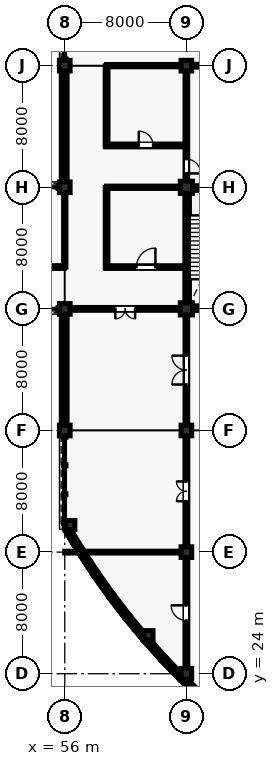
"""IFC4 building model, lengths in metres.
Left out: names, types, materials, properties, quantities, classifications, styles, units other than length and angle.
Written with IfcOpenShell. Run it as: python <this file> out.ifc"""

import sys

from ifc_helpers import new_model, si_unit, direction, frame, frame_2d, origin, origin_2d, place, context, subcontext, project, spatial, rectangle, extrude, element, fill, save


model = new_model("IFC4")
c1 = context("Model", 3, precision=1e-05, world=origin(), true_north=direction((0.0, 1.0)))
c2 = subcontext(c1, "Body", "Model", "MODEL_VIEW")
j1 = project(units=[si_unit("LENGTHUNIT", "METRE"), si_unit("PLANEANGLEUNIT", "RADIAN")], contexts=[c1])
p1 = place(None, origin())
s1 = spatial("IfcSite", under=j1, at=p1, CompositionType="ELEMENT")
p2 = place(p1, origin())
s2 = spatial("IfcBuilding", under=s1, at=p2, CompositionType="ELEMENT")
p3 = place(p2, origin())
s3 = spatial("IfcBuildingStorey", under=s2, at=p3, CompositionType="ELEMENT", Elevation=0.0)
for number, where, z_axis, x_axis in (
    (1, (56.0, 40.0, 0.0), (0.0, 0.0, 1.0), (1.0, 0.0, 0.0)),
    (2, (56.0, 48.0, 0.0), (0.0, 0.0, 1.0), (1.0, 0.0, 0.0)),
    (3, (56.0, 56.0, 0.0), (0.0, 0.0, 1.0), (1.0, 0.0, 0.0)),
    (4, (56.0, 64.0, 0.0), (0.0, 0.0, 1.0), (1.0, 0.0, 0.0)),
    (5, (64.0, 24.0, 0.0), (0.0, 0.0, 1.0), (1.0, 0.0, 0.0)),
    (6, (64.0, 32.0, 0.0), (0.0, 0.0, 1.0), (1.0, 0.0, 0.0)),
    (7, (64.0, 40.0, 0.0), (0.0, 0.0, 1.0), (1.0, 0.0, 0.0)),
):
    element("IfcColumn", number, at=place(p3, frame(where, z_axis=z_axis, x_axis=x_axis)), inside=s3, PredefinedType="COLUMN", context=c2, shape_type="SweptSolid", body=[
        extrude(rectangle(XDim=0.7, YDim=0.7, at=origin_2d()), origin(), (0.0, 0.0, 1.0), 5.28),
    ])
for number, where, z_axis, x_axis in (
    (8, (64.0, 48.0, 0.0), (0.0, 0.0, 1.0), (1.0, 0.0, 0.0)),
    (9, (64.0, 56.0, 0.0), (0.0, 0.0, 1.0), (1.0, 0.0, 0.0)),
):
    element("IfcColumn", number, at=place(p3, frame(where, z_axis=z_axis, x_axis=x_axis)), inside=s3, PredefinedType="COLUMN", context=c2, shape_type="SweptSolid", body=[
        extrude(rectangle(XDim=0.8, YDim=0.8, at=origin_2d()), origin(), (0.0, 0.0, 1.0), 5.28),
    ])
p4 = place(p3, frame((64.0, 64.0, 0.0), z_axis=(0.0, 0.0, 1.0), x_axis=(1.0, 0.0, 0.0)))
e10 = element("IfcColumn", 10, at=p4, inside=s3, PredefinedType="COLUMN", context=c2, shape_type="SweptSolid", body=[
    extrude(rectangle(XDim=0.7, YDim=0.7, at=origin_2d()), origin(), (0.0, 0.0, 1.0), 5.28),
])
for number, where, z_axis, x_axis in (
    (11, (56.364, 33.779, 0.0), (0.0, 0.0, 1.0), (1.0, 0.0, 0.0)),
    (12, (61.505, 26.533, 0.0), (0.0, 0.0, 1.0), (1.0, 0.0, 0.0)),
):
    element("IfcColumn", number, at=place(p3, frame(where, z_axis=z_axis, x_axis=x_axis)), inside=s3, PredefinedType="COLUMN", context=c2, shape_type="SweptSolid", body=[
        extrude(rectangle(XDim=0.6, YDim=0.6, at=origin_2d()), origin(), (0.0, 0.0, 1.0), 5.28),
    ])
p5 = place(p3, frame((56.133, 33.649, 0.0), z_axis=(0.0, 0.0, 1.0), x_axis=(0.51607516088, -0.856543302071, 0.0)))
e13 = element("IfcWall", 13, at=p5, inside=s3, PredefinedType="SOLIDWALL", context=c2, shape_type="SweptSolid", body=[
    extrude(rectangle(XDim=1.795, YDim=0.305, at=frame_2d((0.897, 0.0))), origin(), (0.0, 0.0, 1.0), 5.035),
])
p6 = place(p3, frame((57.056, 32.117, 0.0), z_axis=(0.0, 0.0, 1.0), x_axis=(0.547681678944, -0.836686786408, 0.0)))
e14 = element("IfcWall", 14, at=p6, inside=s3, PredefinedType="SOLIDWALL", context=c2, shape_type="SweptSolid", body=[
    extrude(rectangle(XDim=1.795, YDim=0.305, at=frame_2d((0.897, 0.0))), origin(), (0.0, 0.0, 1.0), 5.035),
])
p7 = place(p6, frame((0.347, 0.0, 0.9)))
e15 = element("IfcOpeningElement", 15, at=p7, cuts=e14, PredefinedType="OPENING", context=c2, shape_type="SweptSolid", body=[
    extrude(rectangle(XDim=1.1, YDim=2.1, at=frame_2d((0.55, 1.05))), frame((0.0, 0.162, 0.0), z_axis=(0.0, -1.0, 0.0), x_axis=(1.0, 0.0, 0.0)), (0.0, 0.0, 1.0), 0.325),
])
p8 = place(p3, frame((58.036, 30.62, 0.0), z_axis=(0.0, 0.0, 1.0), x_axis=(0.578662393636, -0.815567185578, 0.0)))
e16 = element("IfcWall", 16, at=p8, inside=s3, PredefinedType="SOLIDWALL", context=c2, shape_type="SweptSolid", body=[
    extrude(rectangle(XDim=1.795, YDim=0.305, at=frame_2d((0.897, 0.0))), origin(), (0.0, 0.0, 1.0), 5.035),
])
p9 = place(p8, frame((0.348, 0.0, 0.9)))
e17 = element("IfcOpeningElement", 17, at=p9, cuts=e16, PredefinedType="OPENING", context=c2, shape_type="SweptSolid", body=[
    extrude(rectangle(XDim=1.1, YDim=2.1, at=frame_2d((0.55, 1.05))), frame((0.0, 0.162, 0.0), z_axis=(0.0, -1.0, 0.0), x_axis=(1.0, 0.0, 0.0)), (0.0, 0.0, 1.0), 0.325),
])
p10 = place(p3, frame((59.072, 29.16, 0.0), z_axis=(0.0, 0.0, 1.0), x_axis=(0.608776981616, -0.793341406114, 0.0)))
e18 = element("IfcWall", 18, at=p10, inside=s3, PredefinedType="SOLIDWALL", context=c2, shape_type="SweptSolid", body=[
    extrude(rectangle(XDim=1.795, YDim=0.305, at=frame_2d((0.897, 0.0))), origin(), (0.0, 0.0, 1.0), 5.035),
])
p11 = place(p10, frame((0.347, 0.0, 0.9)))
e19 = element("IfcOpeningElement", 19, at=p11, cuts=e18, PredefinedType="OPENING", context=c2, shape_type="SweptSolid", body=[
    extrude(rectangle(XDim=1.1, YDim=2.1, at=frame_2d((0.55, 1.05))), frame((0.0, 0.162, 0.0), z_axis=(0.0, -1.0, 0.0), x_axis=(1.0, 0.0, 0.0)), (0.0, 0.0, 1.0), 0.325),
])
p12 = place(p3, frame((60.161, 27.74, 0.0), z_axis=(0.0, 0.0, 1.0), x_axis=(0.638054732073, -0.769991012207, 0.0)))
e20 = element("IfcWall", 20, at=p12, inside=s3, PredefinedType="SOLIDWALL", context=c2, shape_type="SweptSolid", body=[
    extrude(rectangle(XDim=1.795, YDim=0.305, at=frame_2d((0.897, 0.0))), origin(), (0.0, 0.0, 1.0), 5.035),
])
p13 = place(p3, frame((61.302, 26.363, 0.0), z_axis=(0.0, 0.0, 1.0), x_axis=(0.666277888361, -0.745703543965, 0.0)))
e21 = element("IfcWall", 21, at=p13, inside=s3, PredefinedType="SOLIDWALL", context=c2, shape_type="SweptSolid", body=[
    extrude(rectangle(XDim=1.795, YDim=0.305, at=frame_2d((0.897, 0.0))), origin(), (0.0, 0.0, 1.0), 5.035),
])
p14 = place(p3, frame((62.494, 25.029, 0.0), z_axis=(0.0, 0.0, 1.0), x_axis=(0.693722700342, -0.720242191926, 0.0)))
e22 = element("IfcWall", 22, at=p14, inside=s3, PredefinedType="SOLIDWALL", context=c2, shape_type="SweptSolid", body=[
    extrude(rectangle(XDim=1.795, YDim=0.305, at=frame_2d((0.897, 0.0))), origin(), (0.0, 0.0, 1.0), 5.035),
])
p15 = place(p14, frame((0.347, 0.0, 0.9)))
e23 = element("IfcOpeningElement", 23, at=p15, cuts=e22, PredefinedType="OPENING", context=c2, shape_type="SweptSolid", body=[
    extrude(rectangle(XDim=1.1, YDim=2.1, at=frame_2d((0.55, 1.05))), frame((0.0, 0.162, 0.0), z_axis=(0.0, -1.0, 0.0), x_axis=(1.0, 0.0, 0.0)), (0.0, 0.0, 1.0), 0.325),
])
p16 = place(p3, frame((63.736, 23.74, 0.0), z_axis=(0.0, 0.0, 1.0), x_axis=(0.720242191926, -0.693722700342, 0.0)))
e24 = element("IfcWall", 24, at=p16, inside=s3, PredefinedType="SOLIDWALL", context=c2, shape_type="SweptSolid", body=[
    extrude(rectangle(XDim=1.795, YDim=0.305, at=frame_2d((0.897, 0.0))), origin(), (0.0, 0.0, 1.0), 5.035),
])
p17 = place(p16, frame((0.347, 0.0, 0.9)))
e25 = element("IfcOpeningElement", 25, at=p17, cuts=e24, PredefinedType="OPENING", context=c2, shape_type="SweptSolid", body=[
    extrude(rectangle(XDim=1.1, YDim=2.1, at=frame_2d((0.55, 1.05))), frame((0.0, 0.162, 0.0), z_axis=(0.0, -1.0, 0.0), x_axis=(1.0, 0.0, 0.0)), (0.0, 0.0, 1.0), 0.325),
])
p18 = place(p3, frame((56.0, 40.335, 0.0), z_axis=(0.0, 0.0, 1.0), x_axis=(0.0, 1.0, 0.0)))
e26 = element("IfcWall", 26, at=p18, inside=s3, PredefinedType="SOLIDWALL", context=c2, shape_type="SweptSolid", body=[
    extrude(rectangle(XDim=7.33, YDim=0.305, at=frame_2d((3.665, 0.0))), origin(), (0.0, 0.0, 1.0), 4.61),
])
p19 = place(p18, frame((2.465, 0.0, 0.9)))
e27 = element("IfcOpeningElement", 27, at=p19, cuts=e26, PredefinedType="OPENING", context=c2, shape_type="SweptSolid", body=[
    extrude(rectangle(XDim=2.4, YDim=2.8, at=frame_2d((1.2, 1.4))), frame((0.0, 0.162, 0.0), z_axis=(0.0, -1.0, 0.0), x_axis=(1.0, 0.0, 0.0)), (0.0, 0.0, 1.0), 0.325),
])
p20 = place(p3, frame((56.0, 56.335, 0.0), z_axis=(0.0, 0.0, 1.0), x_axis=(0.0, 1.0, 0.0)))
e28 = element("IfcWall", 28, at=p20, inside=s3, PredefinedType="SOLIDWALL", context=c2, shape_type="SweptSolid", body=[
    extrude(rectangle(XDim=7.33, YDim=0.305, at=frame_2d((3.665, 0.0))), origin(), (0.0, 0.0, 1.0), 4.614),
])
p21 = place(p20, frame((0.744, 0.0, 0.95)))
e29 = element("IfcOpeningElement", 29, at=p21, cuts=e28, PredefinedType="OPENING", context=c2, shape_type="SweptSolid", body=[
    extrude(rectangle(XDim=1.15, YDim=1.65, at=frame_2d((0.575, 0.825))), frame((0.0, 0.162, 0.0), z_axis=(0.0, -1.0, 0.0), x_axis=(1.0, 0.0, 0.0)), (0.0, 0.0, 1.0), 0.325),
])
p22 = place(p20, frame((5.436, 0.0, 0.95)))
e30 = element("IfcOpeningElement", 30, at=p22, cuts=e28, PredefinedType="OPENING", context=c2, shape_type="SweptSolid", body=[
    extrude(rectangle(XDim=1.15, YDim=1.65, at=frame_2d((0.575, 0.825))), frame((0.0, 0.162, 0.0), z_axis=(0.0, -1.0, 0.0), x_axis=(1.0, 0.0, 0.0)), (0.0, 0.0, 1.0), 0.325),
])
p23 = place(p3, frame((64.05, 48.29, 0.0), z_axis=(0.0, 0.0, 1.0), x_axis=(0.0, 1.0, 0.0)))
e31 = element("IfcWall", 31, at=p23, inside=s3, PredefinedType="SHEAR", context=c2, shape_type="SweptSolid", body=[
    extrude(rectangle(XDim=7.42, YDim=0.3, at=frame_2d((3.71, 0.0))), origin(), (0.0, 0.0, 1.0), 5.035),
])
p24 = place(p3, frame((64.29, 55.95, 0.0), z_axis=(0.0, 0.0, 1.0), x_axis=(1.0, 0.0, 0.0)))
e32 = element("IfcWall", 32, at=p24, inside=s3, PredefinedType="SHEAR", context=c2, shape_type="SweptSolid", body=[
    extrude(rectangle(XDim=7.395, YDim=0.3, at=frame_2d((3.698, 0.0))), origin(), (0.0, 0.0, 1.0), 5.035),
])
p25 = place(p3, frame((64.29, 48.05, 0.0), z_axis=(0.0, 0.0, 1.0), x_axis=(1.0, 0.0, 0.0)))
e33 = element("IfcWall", 33, at=p25, inside=s3, PredefinedType="SHEAR", context=c2, shape_type="SweptSolid", body=[
    extrude(rectangle(XDim=3.86, YDim=0.3, at=frame_2d((1.93, 0.0))), origin(), (0.0, 0.0, 1.0), 5.035),
])
p26 = place(p3, frame((48.02, 50.75, 0.0), z_axis=(0.0, 0.0, 1.0), x_axis=(1.0, 0.0, 0.0)))
e34 = element("IfcWall", 34, at=p26, inside=s3, PredefinedType="PARTITIONING", context=c2, shape_type="SweptSolid", body=[
    extrude(rectangle(XDim=7.96, YDim=0.185, at=frame_2d((3.98, 0.0))), origin(), (0.0, 0.0, 1.0), 4.403),
])
p27 = place(p26, frame((3.42, 0.0, 0.0)))
e35 = element("IfcOpeningElement", 35, at=p27, cuts=e34, PredefinedType="OPENING", context=c2, shape_type="SweptSolid", body=[
    extrude(rectangle(XDim=1.12, YDim=2.22, at=frame_2d((0.56, 1.11))), frame((0.0, 0.103, 0.0), z_axis=(0.0, -1.0, 0.0), x_axis=(1.0, 0.0, 0.0)), (0.0, 0.0, 1.0), 0.205),
])
p28 = place(p3, frame((56.0, 50.75, 0.0), z_axis=(0.0, 0.0, 1.0), x_axis=(0.0, 1.0, 0.0)))
e36 = element("IfcWall", 36, at=p28, inside=s3, PredefinedType="PARTITIONING", context=c2, shape_type="SweptSolid", body=[
    extrude(rectangle(XDim=4.89, YDim=0.15, at=frame_2d((2.445, 0.0))), origin(), (0.0, 0.0, 1.0), 4.412),
])
p29 = place(p3, frame((58.7, 50.75, 0.0), z_axis=(0.0, 0.0, 1.0), x_axis=(1.0, 0.0, 0.0)))
e37 = element("IfcWall", 37, at=p29, inside=s3, PredefinedType="PARTITIONING", context=c2, shape_type="SweptSolid", body=[
    extrude(rectangle(XDim=5.28, YDim=0.175, at=frame_2d((2.64, 0.0))), origin(), (0.0, 0.0, 1.0), 4.404),
])
p30 = place(p29, frame((2.015, 0.0, 0.0)))
e38 = element("IfcOpeningElement", 38, at=p30, cuts=e37, PredefinedType="OPENING", context=c2, shape_type="SweptSolid", body=[
    extrude(rectangle(XDim=1.25, YDim=2.18, at=frame_2d((0.625, 1.09))), frame((0.0, 0.097, 0.0), z_axis=(0.0, -1.0, 0.0), x_axis=(1.0, 0.0, 0.0)), (0.0, 0.0, 1.0), 0.195),
])
p31 = place(p3, frame((58.75, 50.7, 0.0), z_axis=(0.0, 0.0, 1.0), x_axis=(0.0, 1.0, 0.0)))
e39 = element("IfcWall", 39, at=p31, inside=s3, PredefinedType="PARTITIONING", context=c2, shape_type="SweptSolid", body=[
    extrude(rectangle(XDim=5.28, YDim=0.175, at=frame_2d((2.64, 0.0))), origin(), (0.0, 0.0, 1.0), 4.336),
])
p32 = place(p3, frame((58.75, 56.0, 0.0), z_axis=(0.0, 0.0, 1.0), x_axis=(1.0, 0.0, 0.0)))
e40 = element("IfcWall", 40, at=p32, inside=s3, PredefinedType="PARTITIONING", context=c2, shape_type="SweptSolid", body=[
    extrude(rectangle(XDim=4.84, YDim=0.15, at=frame_2d((2.42, 0.0))), origin(), (0.0, 0.0, 1.0), 4.336),
])
p33 = place(p3, frame((58.7, 58.75, 0.0), z_axis=(0.0, 0.0, 1.0), x_axis=(1.0, 0.0, 0.0)))
e41 = element("IfcWall", 41, at=p33, inside=s3, PredefinedType="PARTITIONING", context=c2, shape_type="SweptSolid", body=[
    extrude(rectangle(XDim=5.28, YDim=0.185, at=frame_2d((2.64, 0.0))), origin(), (0.0, 0.0, 1.0), 4.471),
])
p34 = place(p33, frame((2.17, 0.0, 0.0)))
e42 = element("IfcOpeningElement", 42, at=p34, cuts=e41, PredefinedType="OPENING", context=c2, shape_type="SweptSolid", body=[
    extrude(rectangle(XDim=0.94, YDim=2.12, at=frame_2d((0.47, 1.06))), frame((0.0, 0.103, 0.0), z_axis=(0.0, -1.0, 0.0), x_axis=(1.0, 0.0, 0.0)), (0.0, 0.0, 1.0), 0.205),
])
p35 = place(p3, frame((58.75, 58.7, 0.0), z_axis=(0.0, 0.0, 1.0), x_axis=(0.0, 1.0, 0.0)))
e43 = element("IfcWall", 43, at=p35, inside=s3, PredefinedType="PARTITIONING", context=c2, shape_type="SweptSolid", body=[
    extrude(rectangle(XDim=5.28, YDim=0.185, at=frame_2d((2.64, 0.0))), origin(), (0.0, 0.0, 1.0), 4.404),
])
p36 = place(p3, frame((58.75, 64.0, 0.0), z_axis=(0.0, 0.0, 1.0), x_axis=(1.0, 0.0, 0.0)))
e44 = element("IfcWall", 44, at=p36, inside=s3, PredefinedType="PARTITIONING", context=c2, shape_type="SweptSolid", body=[
    extrude(rectangle(XDim=4.89, YDim=0.15, at=frame_2d((2.445, 0.0))), origin(), (0.0, 0.0, 1.0), 4.404),
])
p37 = place(p3, frame((64.0, 24.34, 0.0), z_axis=(0.0, 0.0, 1.0), x_axis=(0.0, 1.0, 0.0)))
e45 = element("IfcWall", 45, at=p37, inside=s3, PredefinedType="PARTITIONING", context=c2, shape_type="SweptSolid", body=[
    extrude(rectangle(XDim=7.32, YDim=0.185, at=frame_2d((3.66, 0.0))), origin(), (0.0, 0.0, 1.0), 4.471),
])
p38 = place(p37, frame((3.16, 0.0, 0.0)))
e46 = element("IfcOpeningElement", 46, at=p38, cuts=e45, PredefinedType="OPENING", context=c2, shape_type="SweptSolid", body=[
    extrude(rectangle(XDim=1.0, YDim=2.15, at=frame_2d((0.5, 1.075))), frame((0.0, 0.103, 0.0), z_axis=(0.0, -1.0, 0.0), x_axis=(1.0, 0.0, 0.0)), (0.0, 0.0, 1.0), 0.205),
])
p39 = place(p3, frame((56.0, 32.0, 0.0), z_axis=(0.0, 0.0, 1.0), x_axis=(1.0, 0.0, 0.0)))
e47 = element("IfcWall", 47, at=p39, inside=s3, PredefinedType="PARTITIONING", context=c2, shape_type="SweptSolid", body=[
    extrude(rectangle(XDim=7.66, YDim=0.12, at=frame_2d((3.83, 0.0))), origin(), (0.0, 0.0, 1.0), 5.025),
])
p40 = place(p3, frame((64.0, 32.34, 0.0), z_axis=(0.0, 0.0, 1.0), x_axis=(0.0, 1.0, 0.0)))
e48 = element("IfcWall", 48, at=p40, inside=s3, PredefinedType="PARTITIONING", context=c2, shape_type="SweptSolid", body=[
    extrude(rectangle(XDim=7.32, YDim=0.185, at=frame_2d((3.66, 0.0))), origin(), (0.0, 0.0, 1.0), 4.403),
])
p41 = place(p40, frame((3.01, 0.0, 0.0)))
e49 = element("IfcOpeningElement", 49, at=p41, cuts=e48, PredefinedType="OPENING", context=c2, shape_type="SweptSolid", body=[
    extrude(rectangle(XDim=1.3, YDim=2.2, at=frame_2d((0.65, 1.1))), frame((0.0, 0.103, 0.0), z_axis=(0.0, -1.0, 0.0), x_axis=(1.0, 0.0, 0.0)), (0.0, 0.0, 1.0), 0.205),
])
p42 = place(p3, frame((64.0, 40.34, 0.0), z_axis=(0.0, 0.0, 1.0), x_axis=(0.0, 1.0, 0.0)))
e50 = element("IfcWall", 50, at=p42, inside=s3, PredefinedType="PARTITIONING", context=c2, shape_type="SweptSolid", body=[
    extrude(rectangle(XDim=7.27, YDim=0.175, at=frame_2d((3.635, 0.0))), origin(), (0.0, 0.0, 1.0), 4.412),
])
p43 = place(p42, frame((2.685, 0.0, 0.0)))
e51 = element("IfcOpeningElement", 51, at=p43, cuts=e50, PredefinedType="OPENING", context=c2, shape_type="SweptSolid", body=[
    extrude(rectangle(XDim=1.9, YDim=2.38, at=frame_2d((0.95, 1.19))), frame((0.0, 0.097, 0.0), z_axis=(0.0, -1.0, 0.0), x_axis=(1.0, 0.0, 0.0)), (0.0, 0.0, 1.0), 0.195),
])
p44 = place(p3, frame((56.34, 48.0, 0.0), z_axis=(0.0, 0.0, 1.0), x_axis=(1.0, 0.0, 0.0)))
e52 = element("IfcWall", 52, at=p44, inside=s3, PredefinedType="PARTITIONING", context=c2, shape_type="SweptSolid", body=[
    extrude(rectangle(XDim=7.27, YDim=0.185, at=frame_2d((3.635, 0.0))), origin(), (0.0, 0.0, 1.0), 4.403),
])
p45 = place(p44, frame((2.985, 0.0, 0.0)))
e53 = element("IfcOpeningElement", 53, at=p45, cuts=e52, PredefinedType="OPENING", context=c2, shape_type="SweptSolid", body=[
    extrude(rectangle(XDim=1.3, YDim=2.2, at=frame_2d((0.65, 1.1))), frame((0.0, 0.103, 0.0), z_axis=(0.0, -1.0, 0.0), x_axis=(1.0, 0.0, 0.0)), (0.0, 0.0, 1.0), 0.205),
])
p46 = place(p3, frame((64.0, 56.39, 0.0), z_axis=(0.0, 0.0, 1.0), x_axis=(0.0, 1.0, 0.0)))
e54 = element("IfcWall", 54, at=p46, inside=s3, PredefinedType="PARTITIONING", context=c2, shape_type="SweptSolid", body=[
    extrude(rectangle(XDim=7.27, YDim=0.175, at=frame_2d((3.635, 0.0))), origin(), (0.0, 0.0, 1.0), 4.471),
])
p47 = place(p46, frame((0.52, 0.0, 0.0)))
e55 = element("IfcOpeningElement", 55, at=p47, cuts=e54, PredefinedType="OPENING", context=c2, shape_type="SweptSolid", body=[
    extrude(rectangle(XDim=0.94, YDim=2.12, at=frame_2d((0.47, 1.06))), frame((0.0, 0.097, 0.0), z_axis=(0.0, -1.0, 0.0), x_axis=(1.0, 0.0, 0.0)), (0.0, 0.0, 1.0), 0.195),
])
p48 = place(p3, frame((64.34, 64.0, 0.0), z_axis=(0.0, 0.0, 1.0), x_axis=(1.0, 0.0, 0.0)))
e56 = element("IfcWall", 56, at=p48, inside=s3, PredefinedType="PARTITIONING", context=c2, shape_type="SweptSolid", body=[
    extrude(rectangle(XDim=7.245, YDim=0.185, at=frame_2d((3.623, 0.0))), origin(), (0.0, 0.0, 1.0), 4.327),
])
p49 = place(p7, origin())
e57 = element("IfcWindow", 57, at=p49, inside=s3, PartitioningType="SINGLE_PANEL", PredefinedType="WINDOW", context=c2, shape_type="SweptSolid", body=[
    extrude(rectangle(XDim=1.1, YDim=2.1, at=frame_2d((0.55, 1.05))), frame((0.0, 0.03, 0.0), z_axis=(0.0, -1.0, 0.0), x_axis=(1.0, 0.0, 0.0)), (0.0, 0.0, 1.0), 0.06),
])
fill(e15, e57)
p50 = place(p9, origin())
e58 = element("IfcWindow", 58, at=p50, inside=s3, PartitioningType="SINGLE_PANEL", PredefinedType="WINDOW", context=c2, shape_type="SweptSolid", body=[
    extrude(rectangle(XDim=1.1, YDim=2.1, at=frame_2d((0.55, 1.05))), frame((0.0, 0.03, 0.0), z_axis=(0.0, -1.0, 0.0), x_axis=(1.0, 0.0, 0.0)), (0.0, 0.0, 1.0), 0.06),
])
fill(e17, e58)
p51 = place(p11, origin())
e59 = element("IfcWindow", 59, at=p51, inside=s3, PartitioningType="SINGLE_PANEL", PredefinedType="WINDOW", context=c2, shape_type="SweptSolid", body=[
    extrude(rectangle(XDim=1.1, YDim=2.1, at=frame_2d((0.55, 1.05))), frame((0.0, 0.03, 0.0), z_axis=(0.0, -1.0, 0.0), x_axis=(1.0, 0.0, 0.0)), (0.0, 0.0, 1.0), 0.06),
])
fill(e19, e59)
p52 = place(p15, origin())
e60 = element("IfcWindow", 60, at=p52, inside=s3, PartitioningType="SINGLE_PANEL", PredefinedType="WINDOW", context=c2, shape_type="SweptSolid", body=[
    extrude(rectangle(XDim=1.1, YDim=2.1, at=frame_2d((0.55, 1.05))), frame((0.0, 0.03, 0.0), z_axis=(0.0, -1.0, 0.0), x_axis=(1.0, 0.0, 0.0)), (0.0, 0.0, 1.0), 0.06),
])
fill(e23, e60)
p53 = place(p17, origin())
e61 = element("IfcWindow", 61, at=p53, inside=s3, PartitioningType="SINGLE_PANEL", PredefinedType="WINDOW", context=c2, shape_type="SweptSolid", body=[
    extrude(rectangle(XDim=1.1, YDim=2.1, at=frame_2d((0.55, 1.05))), frame((0.0, 0.03, 0.0), z_axis=(0.0, -1.0, 0.0), x_axis=(1.0, 0.0, 0.0)), (0.0, 0.0, 1.0), 0.06),
])
fill(e25, e61)
p54 = place(p19, origin())
e62 = element("IfcWindow", 62, at=p54, inside=s3, PartitioningType="SINGLE_PANEL", PredefinedType="WINDOW", context=c2, shape_type="SweptSolid", body=[
    extrude(rectangle(XDim=2.4, YDim=2.8, at=frame_2d((1.2, 1.4))), frame((0.0, 0.03, 0.0), z_axis=(0.0, -1.0, 0.0), x_axis=(1.0, 0.0, 0.0)), (0.0, 0.0, 1.0), 0.06),
])
fill(e27, e62)
p55 = place(p21, origin())
e63 = element("IfcWindow", 63, at=p55, inside=s3, PartitioningType="SINGLE_PANEL", PredefinedType="WINDOW", context=c2, shape_type="SweptSolid", body=[
    extrude(rectangle(XDim=1.15, YDim=1.65, at=frame_2d((0.575, 0.825))), frame((0.0, 0.03, 0.0), z_axis=(0.0, -1.0, 0.0), x_axis=(1.0, 0.0, 0.0)), (0.0, 0.0, 1.0), 0.06),
])
fill(e29, e63)
p56 = place(p22, origin())
e64 = element("IfcWindow", 64, at=p56, inside=s3, PartitioningType="SINGLE_PANEL", PredefinedType="WINDOW", context=c2, shape_type="SweptSolid", body=[
    extrude(rectangle(XDim=1.15, YDim=1.65, at=frame_2d((0.575, 0.825))), frame((0.0, 0.03, 0.0), z_axis=(0.0, -1.0, 0.0), x_axis=(1.0, 0.0, 0.0)), (0.0, 0.0, 1.0), 0.06),
])
fill(e30, e64)
p57 = place(p30, origin())
e65 = element("IfcDoor", 65, at=p57, inside=s3, OperationType="SINGLE_SWING_RIGHT", PredefinedType="DOOR", context=c2, shape_type="SweptSolid", body=[
    extrude(rectangle(XDim=1.25, YDim=2.18, at=frame_2d((0.625, 1.09))), frame((0.0, 0.025, 0.0), z_axis=(0.0, -1.0, 0.0), x_axis=(1.0, 0.0, 0.0)), (0.0, 0.0, 1.0), 0.05),
])
fill(e38, e65)
p58 = place(p34, origin())
e66 = element("IfcDoor", 66, at=p58, inside=s3, OperationType="SINGLE_SWING_LEFT", PredefinedType="DOOR", context=c2, shape_type="SweptSolid", body=[
    extrude(rectangle(XDim=0.94, YDim=2.12, at=frame_2d((0.47, 1.06))), frame((0.0, 0.025, 0.0), z_axis=(0.0, -1.0, 0.0), x_axis=(1.0, 0.0, 0.0)), (0.0, 0.0, 1.0), 0.05),
])
fill(e42, e66)
p59 = place(p38, origin())
e67 = element("IfcDoor", 67, at=p59, inside=s3, OperationType="SINGLE_SWING_RIGHT", PredefinedType="DOOR", context=c2, shape_type="SweptSolid", body=[
    extrude(rectangle(XDim=1.0, YDim=2.15, at=frame_2d((0.5, 1.075))), frame((0.0, 0.025, 0.0), z_axis=(0.0, -1.0, 0.0), x_axis=(1.0, 0.0, 0.0)), (0.0, 0.0, 1.0), 0.05),
])
fill(e46, e67)
p60 = place(p41, origin())
e68 = element("IfcDoor", 68, at=p60, inside=s3, OperationType="DOUBLE_DOOR_SINGLE_SWING", PredefinedType="DOOR", context=c2, shape_type="SweptSolid", body=[
    extrude(rectangle(XDim=1.3, YDim=2.2, at=frame_2d((0.65, 1.1))), frame((0.0, 0.025, 0.0), z_axis=(0.0, -1.0, 0.0), x_axis=(1.0, 0.0, 0.0)), (0.0, 0.0, 1.0), 0.05),
])
fill(e49, e68)
p61 = place(p43, origin())
e69 = element("IfcDoor", 69, at=p61, inside=s3, OperationType="DOUBLE_DOOR_SINGLE_SWING", PredefinedType="DOOR", context=c2, shape_type="SweptSolid", body=[
    extrude(rectangle(XDim=1.9, YDim=2.38, at=frame_2d((0.95, 1.19))), frame((0.0, 0.025, 0.0), z_axis=(0.0, -1.0, 0.0), x_axis=(1.0, 0.0, 0.0)), (0.0, 0.0, 1.0), 0.05),
])
fill(e51, e69)
p62 = place(p45, frame((1.3, 0.0, 0.0), z_axis=(0.0, 0.0, 1.0), x_axis=(-1.0, 0.0, 0.0)))
e70 = element("IfcDoor", 70, at=p62, inside=s3, OperationType="DOUBLE_DOOR_SINGLE_SWING", PredefinedType="DOOR", context=c2, shape_type="SweptSolid", body=[
    extrude(rectangle(XDim=1.3, YDim=2.2, at=frame_2d((0.65, 1.1))), frame((0.0, 0.025, 0.0), z_axis=(0.0, -1.0, 0.0), x_axis=(1.0, 0.0, 0.0)), (0.0, 0.0, 1.0), 0.05),
])
fill(e53, e70)
p63 = place(p47, frame((0.94, 0.0, 0.0), z_axis=(0.0, 0.0, 1.0), x_axis=(-1.0, 0.0, 0.0)))
e71 = element("IfcDoor", 71, at=p63, inside=s3, OperationType="SINGLE_SWING_LEFT", PredefinedType="DOOR", context=c2, shape_type="SweptSolid", body=[
    extrude(rectangle(XDim=0.94, YDim=2.12, at=frame_2d((0.47, 1.06))), frame((0.0, 0.025, 0.0), z_axis=(0.0, -1.0, 0.0), x_axis=(1.0, 0.0, 0.0)), (0.0, 0.0, 1.0), 0.05),
])
fill(e55, e71)
save(model, sys.argv[1])
